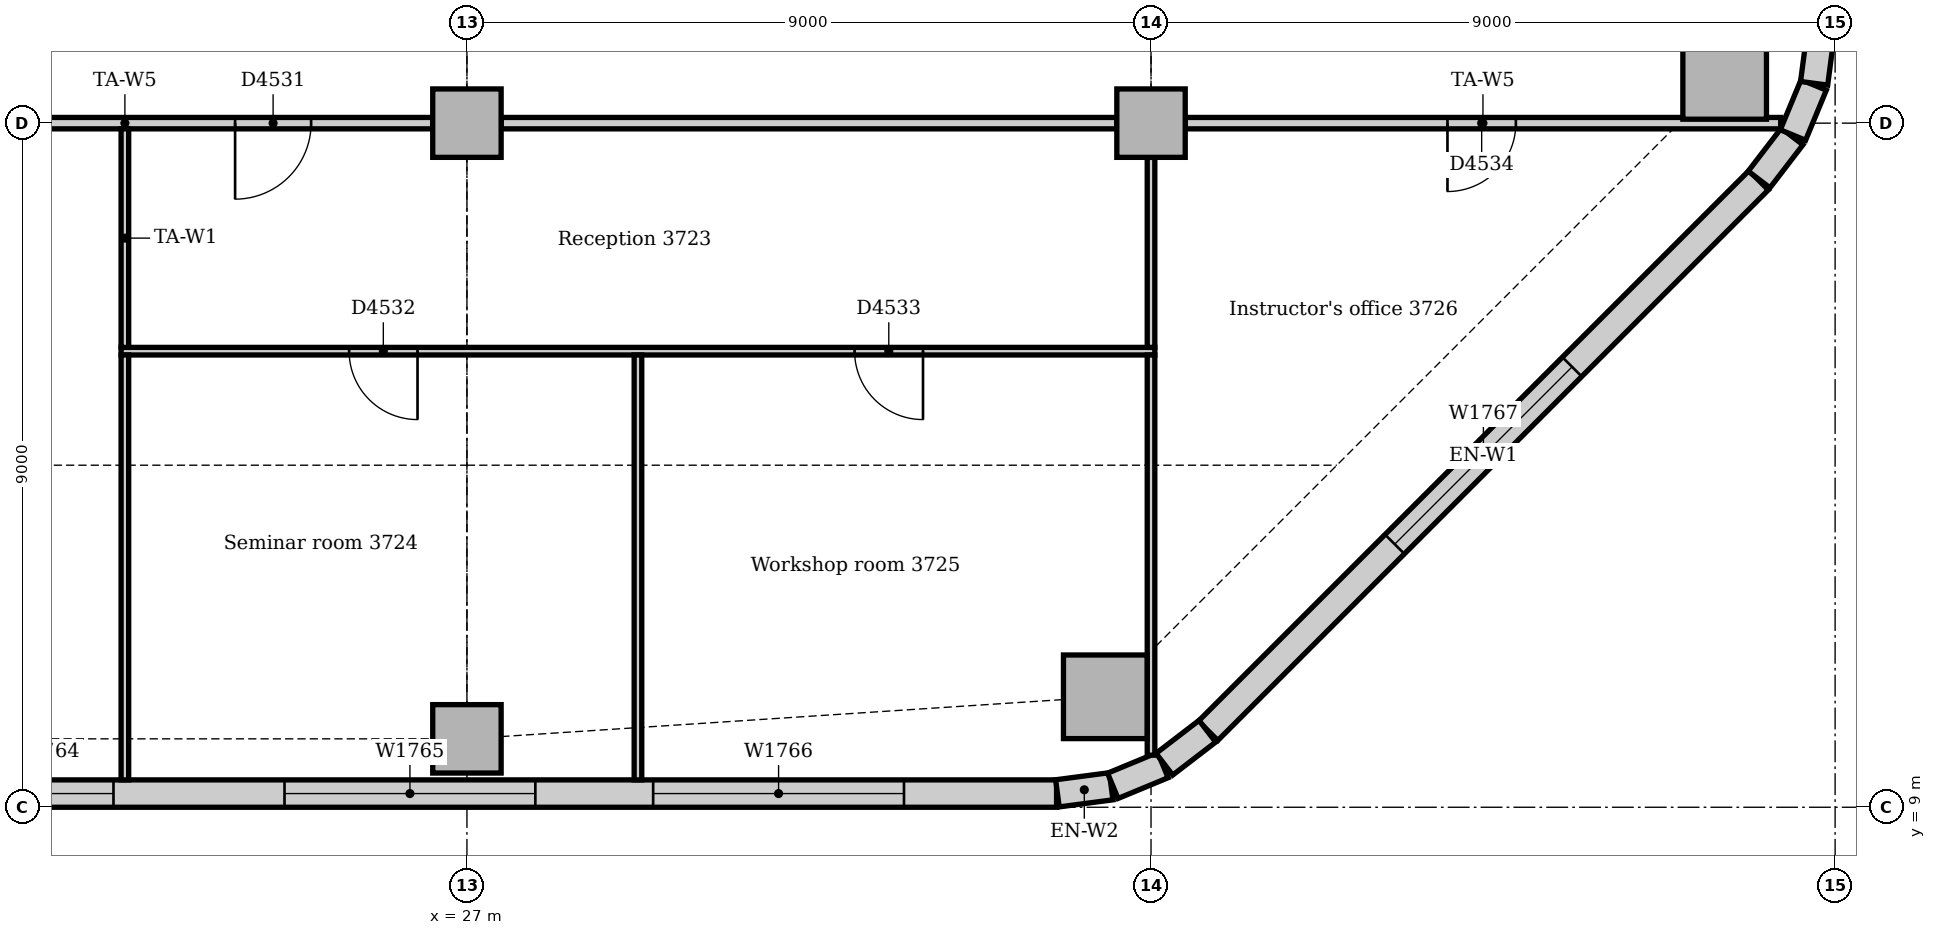
"""IFC4 building model, lengths in metres.
Left out: names, types, materials, properties, quantities, classifications, styles, units other than length and angle.
Written with IfcOpenShell. Run it as: python <this file> out.ifc"""

import sys

from ifc_helpers import new_model, si_unit, direction, frame, frame_2d, origin, origin_2d, place, context, subcontext, project, spatial, rectangle, extrude, element, fill, save


model = new_model("IFC4")
c1 = context("Model", 3, precision=1e-05, world=origin(), true_north=direction((0.0, 1.0)))
c2 = subcontext(c1, "Body", "Model", "MODEL_VIEW")
j1 = project(units=[si_unit("LENGTHUNIT", "METRE"), si_unit("PLANEANGLEUNIT", "RADIAN")], contexts=[c1])
p1 = place(None, origin())
s1 = spatial("IfcSite", under=j1, at=p1, CompositionType="ELEMENT")
p2 = place(p1, origin())
s2 = spatial("IfcBuilding", under=s1, at=p2, CompositionType="ELEMENT")
p3 = place(p2, frame((0.0, 0.0, 157.0)))
s3 = spatial("IfcBuildingStorey", under=s2, at=p3, CompositionType="ELEMENT", Elevation=157.0)
for number, where, z_axis, x_axis in (
    (1, (35.398, 10.453, 0.0), (0.0, 0.0, 1.0), (1.0, 0.0, 0.0)),
    (2, (43.547, 18.602, 0.0), (0.0, 0.0, 1.0), (1.0, 0.0, 0.0)),
):
    element("IfcColumn", number, at=place(p3, frame(where, z_axis=z_axis, x_axis=x_axis)), inside=s3, PredefinedType="COLUMN", context=c2, shape_type="SweptSolid", body=[
        extrude(rectangle(XDim=1.1, YDim=1.1, at=origin_2d()), origin(), (0.0, 0.0, 1.0), 3.85),
    ])
for number, where, z_axis, x_axis in (
    (3, (27.0, 9.9, 0.0), (0.0, 0.0, 1.0), (1.0, 0.0, 0.0)),
    (4, (27.0, 18.0, 0.0), (0.0, 0.0, 1.0), (1.0, 0.0, 0.0)),
    (5, (36.0, 18.0, 0.0), (0.0, 0.0, 1.0), (1.0, 0.0, 0.0)),
):
    element("IfcColumn", number, at=place(p3, frame(where, z_axis=z_axis, x_axis=x_axis)), inside=s3, PredefinedType="COLUMN", context=c2, shape_type="SweptSolid", body=[
        extrude(rectangle(XDim=0.9, YDim=0.9, at=origin_2d()), origin(), (0.0, 0.0, 1.0), 3.85),
    ])
p4 = place(p3, frame((4.243, 9.18, 0.0), z_axis=(0.0, 0.0, 1.0), x_axis=(1.0, 0.0, 0.0)))
e6 = element("IfcWall", 6, at=p4, inside=s3, PredefinedType="STANDARD", context=c2, shape_type="SweptSolid", body=[
    extrude(rectangle(XDim=30.515, YDim=0.36, at=frame_2d((15.257, 0.0))), origin(), (0.0, 0.0, 1.0), 3.85),
])
p5 = place(p4, frame((2.707, 0.0, 0.9)))
e7 = element("IfcOpeningElement", 7, at=p5, cuts=e6, PredefinedType="OPENING", context=c2, shape_type="SweptSolid", body=[
    extrude(rectangle(XDim=3.3, YDim=1.6, at=frame_2d((1.65, 0.8))), frame((0.0, 0.19, 0.0), z_axis=(0.0, -1.0, 0.0), x_axis=(1.0, 0.0, 0.0)), (0.0, 0.0, 1.0), 0.38),
])
p6 = place(p4, frame((7.307, 0.0, 0.9)))
e8 = element("IfcOpeningElement", 8, at=p6, cuts=e6, PredefinedType="OPENING", context=c2, shape_type="SweptSolid", body=[
    extrude(rectangle(XDim=1.8, YDim=1.6, at=frame_2d((0.9, 0.8))), frame((0.0, 0.19, 0.0), z_axis=(0.0, -1.0, 0.0), x_axis=(1.0, 0.0, 0.0)), (0.0, 0.0, 1.0), 0.38),
])
p7 = place(p4, frame((11.357, 0.0, 0.9)))
e9 = element("IfcOpeningElement", 9, at=p7, cuts=e6, PredefinedType="OPENING", context=c2, shape_type="SweptSolid", body=[
    extrude(rectangle(XDim=3.3, YDim=1.6, at=frame_2d((1.65, 0.8))), frame((0.0, 0.19, 0.0), z_axis=(0.0, -1.0, 0.0), x_axis=(1.0, 0.0, 0.0)), (0.0, 0.0, 1.0), 0.38),
])
p8 = place(p4, frame((16.307, 0.0, 0.9)))
e10 = element("IfcOpeningElement", 10, at=p8, cuts=e6, PredefinedType="OPENING", context=c2, shape_type="SweptSolid", body=[
    extrude(rectangle(XDim=1.8, YDim=1.6, at=frame_2d((0.9, 0.8))), frame((0.0, 0.19, 0.0), z_axis=(0.0, -1.0, 0.0), x_axis=(1.0, 0.0, 0.0)), (0.0, 0.0, 1.0), 0.38),
])
p9 = place(p4, frame((20.357, 0.0, 0.9)))
e11 = element("IfcOpeningElement", 11, at=p9, cuts=e6, PredefinedType="OPENING", context=c2, shape_type="SweptSolid", body=[
    extrude(rectangle(XDim=3.3, YDim=1.6, at=frame_2d((1.65, 0.8))), frame((0.0, 0.19, 0.0), z_axis=(0.0, -1.0, 0.0), x_axis=(1.0, 0.0, 0.0)), (0.0, 0.0, 1.0), 0.38),
])
p10 = place(p4, frame((25.207, 0.0, 0.9)))
e12 = element("IfcOpeningElement", 12, at=p10, cuts=e6, PredefinedType="OPENING", context=c2, shape_type="SweptSolid", body=[
    extrude(rectangle(XDim=3.3, YDim=1.6, at=frame_2d((1.65, 0.8))), frame((0.0, 0.19, 0.0), z_axis=(0.0, -1.0, 0.0), x_axis=(1.0, 0.0, 0.0)), (0.0, 0.0, 1.0), 0.38),
])
p11 = place(p3, frame((36.751, 10.006, 0.0), z_axis=(0.0, 0.0, 1.0), x_axis=(0.707106781187, 0.707106781187, 0.0)))
e13 = element("IfcWall", 13, at=p11, inside=s3, PredefinedType="STANDARD", context=c2, shape_type="SweptSolid", body=[
    extrude(rectangle(XDim=10.243, YDim=0.36, at=frame_2d((5.121, 0.0))), origin(), (0.0, 0.0, 1.0), 3.85),
])
p12 = place(p11, frame((3.471, 0.0, 0.9)))
e14 = element("IfcOpeningElement", 14, at=p12, cuts=e13, PredefinedType="OPENING", context=c2, shape_type="SweptSolid", body=[
    extrude(rectangle(XDim=3.3, YDim=1.6, at=frame_2d((1.65, 0.8))), frame((0.0, 0.19, 0.0), z_axis=(0.0, -1.0, 0.0), x_axis=(1.0, 0.0, 0.0)), (0.0, 0.0, 1.0), 0.38),
])
for number, where, z_axis, x_axis in (
    (15, (34.769, 9.183, 0.0), (0.0, 0.0, 1.0), (0.991, 0.131, 0.0)),
    (16, (35.497, 9.282, 0.0), (0.0, 0.0, 1.0), (0.924, 0.383, 0.0)),
):
    element("IfcWall", number, at=place(p3, frame(where, z_axis=z_axis, x_axis=x_axis)), inside=s3, PredefinedType="STANDARD", context=c2, shape_type="SweptSolid", body=[
        extrude(rectangle(XDim=0.713, YDim=0.36, at=frame_2d((0.356, 0.0))), origin(), (0.0, 0.0, 1.0), 3.85),
    ])
for number, where, z_axis, x_axis in (
    (17, (36.175, 9.566, 0.0), (0.0, 0.0, 1.0), (0.793, 0.609, 0.0)),
    (18, (44.0, 17.259, 0.0), (0.0, 0.0, 1.0), (0.609, 0.793, 0.0)),
):
    element("IfcWall", number, at=place(p3, frame(where, z_axis=z_axis, x_axis=x_axis)), inside=s3, PredefinedType="STANDARD", context=c2, shape_type="SweptSolid", body=[
        extrude(rectangle(XDim=0.713, YDim=0.36, at=frame_2d((0.357, 0.0))), origin(), (0.0, 0.0, 1.0), 3.85),
    ])
for number, where, z_axis, x_axis in (
    (19, (44.445, 17.844, 0.0), (0.0, 0.0, 1.0), (0.383, 0.924, 0.0)),
    (20, (44.724, 18.524, 0.0), (0.0, 0.0, 1.0), (0.131, 0.991, 0.0)),
):
    element("IfcWall", number, at=place(p3, frame(where, z_axis=z_axis, x_axis=x_axis)), inside=s3, PredefinedType="STANDARD", context=c2, shape_type="SweptSolid", body=[
        extrude(rectangle(XDim=0.713, YDim=0.36, at=frame_2d((0.356, 0.0))), origin(), (0.0, 0.0, 1.0), 3.85),
    ])
p13 = place(p3, frame((18.45, 18.0, 0.0), z_axis=(0.0, 0.0, 1.0), x_axis=(1.0, 0.0, 0.0)))
e21 = element("IfcWall", 21, at=p13, inside=s3, PredefinedType="PARTITIONING", context=c2, shape_type="SweptSolid", body=[
    extrude(rectangle(XDim=8.1, YDim=0.15, at=frame_2d((4.05, 0.0))), origin(), (0.0, 0.0, 1.0), 3.262),
])
p14 = place(p13, frame((5.5, 0.0, 0.0)))
e22 = element("IfcOpeningElement", 22, at=p14, cuts=e21, PredefinedType="OPENING", context=c2, shape_type="SweptSolid", body=[
    extrude(rectangle(XDim=1.0, YDim=2.1, at=frame_2d((0.5, 1.05))), frame((0.0, 0.085, 0.0), z_axis=(0.0, -1.0, 0.0), x_axis=(1.0, 0.0, 0.0)), (0.0, 0.0, 1.0), 0.17),
])
p15 = place(p3, frame((27.45, 18.0, 0.0), z_axis=(0.0, 0.0, 1.0), x_axis=(1.0, 0.0, 0.0)))
e23 = element("IfcWall", 23, at=p15, inside=s3, PredefinedType="PARTITIONING", context=c2, shape_type="SweptSolid", body=[
    extrude(rectangle(XDim=8.1, YDim=0.15, at=frame_2d((4.05, 0.0))), origin(), (0.0, 0.0, 1.0), 3.262),
])
p16 = place(p3, frame((36.45, 18.0, 0.0), z_axis=(0.0, 0.0, 1.0), x_axis=(1.0, 0.0, 0.0)))
e24 = element("IfcWall", 24, at=p16, inside=s3, PredefinedType="PARTITIONING", context=c2, shape_type="SweptSolid", body=[
    extrude(rectangle(XDim=7.834, YDim=0.15, at=frame_2d((3.917, 0.0))), origin(), (0.0, 0.0, 1.0), 3.35),
])
p17 = place(p16, frame((3.45, 0.0, 0.0)))
e25 = element("IfcOpeningElement", 25, at=p17, cuts=e24, PredefinedType="OPENING", context=c2, shape_type="SweptSolid", body=[
    extrude(rectangle(XDim=0.9, YDim=2.1, at=frame_2d((0.45, 1.05))), frame((0.0, 0.085, 0.0), z_axis=(0.0, -1.0, 0.0), x_axis=(1.0, 0.0, 0.0)), (0.0, 0.0, 1.0), 0.17),
])
p18 = place(p3, frame((22.45, 15.0, 0.0), z_axis=(0.0, 0.0, 1.0), x_axis=(1.0, 0.0, 0.0)))
e26 = element("IfcWall", 26, at=p18, inside=s3, PredefinedType="PARTITIONING", context=c2, shape_type="SweptSolid", body=[
    extrude(rectangle(XDim=13.6, YDim=0.1, at=frame_2d((6.8, 0.0))), origin(), (0.0, 0.0, 1.0), 3.85),
])
p19 = place(p18, frame((3.0, 0.0, 0.0)))
e27 = element("IfcOpeningElement", 27, at=p19, cuts=e26, PredefinedType="OPENING", context=c2, shape_type="SweptSolid", body=[
    extrude(rectangle(XDim=0.9, YDim=2.1, at=frame_2d((0.45, 1.05))), frame((0.0, 0.06, 0.0), z_axis=(0.0, -1.0, 0.0), x_axis=(1.0, 0.0, 0.0)), (0.0, 0.0, 1.0), 0.12),
])
p20 = place(p18, frame((9.65, 0.0, 0.0)))
e28 = element("IfcOpeningElement", 28, at=p20, cuts=e26, PredefinedType="OPENING", context=c2, shape_type="SweptSolid", body=[
    extrude(rectangle(XDim=0.9, YDim=2.1, at=frame_2d((0.45, 1.05))), frame((0.0, 0.06, 0.0), z_axis=(0.0, -1.0, 0.0), x_axis=(1.0, 0.0, 0.0)), (0.0, 0.0, 1.0), 0.12),
])
p21 = place(p3, frame((22.5, 15.05, 0.0), z_axis=(0.0, 0.0, 1.0), x_axis=(0.0, 1.0, 0.0)))
e29 = element("IfcWall", 29, at=p21, inside=s3, PredefinedType="PARTITIONING", context=c2, shape_type="SweptSolid", body=[
    extrude(rectangle(XDim=2.875, YDim=0.1, at=frame_2d((1.438, 0.0))), origin(), (0.0, 0.0, 1.0), 3.85),
])
p22 = place(p3, frame((22.5, 9.36, 0.0), z_axis=(0.0, 0.0, 1.0), x_axis=(0.0, 1.0, 0.0)))
e30 = element("IfcWall", 30, at=p22, inside=s3, PredefinedType="PARTITIONING", context=c2, shape_type="SweptSolid", body=[
    extrude(rectangle(XDim=5.59, YDim=0.1, at=frame_2d((2.795, 0.0))), origin(), (0.0, 0.0, 1.0), 3.85),
])
p23 = place(p3, frame((36.0, 15.05, 0.0), z_axis=(0.0, 0.0, 1.0), x_axis=(0.0, 1.0, 0.0)))
e31 = element("IfcWall", 31, at=p23, inside=s3, PredefinedType="PARTITIONING", context=c2, shape_type="SweptSolid", body=[
    extrude(rectangle(XDim=2.5, YDim=0.1, at=frame_2d((1.25, 0.0))), origin(), (0.0, 0.0, 1.0), 3.35),
])
p24 = place(p3, frame((36.0, 9.685, 0.0), z_axis=(0.0, 0.0, 1.0), x_axis=(0.0, 1.0, 0.0)))
e32 = element("IfcWall", 32, at=p24, inside=s3, PredefinedType="PARTITIONING", context=c2, shape_type="SweptSolid", body=[
    extrude(rectangle(XDim=5.265, YDim=0.1, at=frame_2d((2.632, 0.0))), origin(), (0.0, 0.0, 1.0), 3.35),
])
p25 = place(p3, frame((29.25, 9.36, 0.0), z_axis=(0.0, 0.0, 1.0), x_axis=(0.0, 1.0, 0.0)))
e33 = element("IfcWall", 33, at=p25, inside=s3, PredefinedType="PARTITIONING", context=c2, shape_type="SweptSolid", body=[
    extrude(rectangle(XDim=5.59, YDim=0.1, at=frame_2d((2.795, 0.0))), origin(), (0.0, 0.0, 1.0), 3.85),
])
p26 = place(p8, origin())
e34 = element("IfcWindow", 34, at=p26, inside=s3, PartitioningType="SINGLE_PANEL", PredefinedType="WINDOW", context=c2, shape_type="SweptSolid", body=[
    extrude(rectangle(XDim=1.8, YDim=1.6, at=frame_2d((0.9, 0.8))), frame((0.0, 0.13, 0.0), z_axis=(0.0, -1.0, 0.0), x_axis=(1.0, 0.0, 0.0)), (0.0, 0.0, 1.0), 0.06),
])
fill(e10, e34)
p27 = place(p9, origin())
e35 = element("IfcWindow", 35, at=p27, inside=s3, PartitioningType="SINGLE_PANEL", PredefinedType="WINDOW", context=c2, shape_type="SweptSolid", body=[
    extrude(rectangle(XDim=3.3, YDim=1.6, at=frame_2d((1.65, 0.8))), frame((0.0, 0.13, 0.0), z_axis=(0.0, -1.0, 0.0), x_axis=(1.0, 0.0, 0.0)), (0.0, 0.0, 1.0), 0.06),
])
fill(e11, e35)
p28 = place(p10, origin())
e36 = element("IfcWindow", 36, at=p28, inside=s3, PartitioningType="SINGLE_PANEL", PredefinedType="WINDOW", context=c2, shape_type="SweptSolid", body=[
    extrude(rectangle(XDim=3.3, YDim=1.6, at=frame_2d((1.65, 0.8))), frame((0.0, 0.13, 0.0), z_axis=(0.0, -1.0, 0.0), x_axis=(1.0, 0.0, 0.0)), (0.0, 0.0, 1.0), 0.06),
])
fill(e12, e36)
p29 = place(p12, origin())
e37 = element("IfcWindow", 37, at=p29, inside=s3, PartitioningType="SINGLE_PANEL", PredefinedType="WINDOW", context=c2, shape_type="SweptSolid", body=[
    extrude(rectangle(XDim=3.3, YDim=1.6, at=frame_2d((1.65, 0.8))), frame((0.0, 0.13, 0.0), z_axis=(0.0, -1.0, 0.0), x_axis=(1.0, 0.0, 0.0)), (0.0, 0.0, 1.0), 0.06),
])
fill(e14, e37)
p30 = place(p14, frame((1.0, 0.0, 0.0), z_axis=(0.0, 0.0, 1.0), x_axis=(-1.0, 0.0, 0.0)))
e38 = element("IfcDoor", 38, at=p30, inside=s3, OperationType="SINGLE_SWING_RIGHT", PredefinedType="DOOR", context=c2, shape_type="SweptSolid", body=[
    extrude(rectangle(XDim=1.0, YDim=2.1, at=frame_2d((0.5, 1.05))), frame((0.0, 0.025, 0.0), z_axis=(0.0, -1.0, 0.0), x_axis=(1.0, 0.0, 0.0)), (0.0, 0.0, 1.0), 0.05),
])
fill(e22, e38)
p31 = place(p19, frame((0.9, 0.0, 0.0), z_axis=(0.0, 0.0, 1.0), x_axis=(-1.0, 0.0, 0.0)))
e39 = element("IfcDoor", 39, at=p31, inside=s3, OperationType="SINGLE_SWING_LEFT", PredefinedType="DOOR", context=c2, shape_type="SweptSolid", body=[
    extrude(rectangle(XDim=0.9, YDim=2.1, at=frame_2d((0.45, 1.05))), frame((0.0, 0.025, 0.0), z_axis=(0.0, -1.0, 0.0), x_axis=(1.0, 0.0, 0.0)), (0.0, 0.0, 1.0), 0.05),
])
fill(e27, e39)
p32 = place(p20, frame((0.9, 0.0, 0.0), z_axis=(0.0, 0.0, 1.0), x_axis=(-1.0, 0.0, 0.0)))
e40 = element("IfcDoor", 40, at=p32, inside=s3, OperationType="SINGLE_SWING_LEFT", PredefinedType="DOOR", context=c2, shape_type="SweptSolid", body=[
    extrude(rectangle(XDim=0.9, YDim=2.1, at=frame_2d((0.45, 1.05))), frame((0.0, 0.025, 0.0), z_axis=(0.0, -1.0, 0.0), x_axis=(1.0, 0.0, 0.0)), (0.0, 0.0, 1.0), 0.05),
])
fill(e28, e40)
p33 = place(p17, frame((0.9, 0.0, 0.0), z_axis=(0.0, 0.0, 1.0), x_axis=(-1.0, 0.0, 0.0)))
e41 = element("IfcDoor", 41, at=p33, inside=s3, OperationType="SINGLE_SWING_RIGHT", PredefinedType="DOOR", context=c2, shape_type="SweptSolid", body=[
    extrude(rectangle(XDim=0.9, YDim=2.1, at=frame_2d((0.45, 1.05))), frame((0.0, 0.025, 0.0), z_axis=(0.0, -1.0, 0.0), x_axis=(1.0, 0.0, 0.0)), (0.0, 0.0, 1.0), 0.05),
])
fill(e25, e41)
save(model, sys.argv[1])
